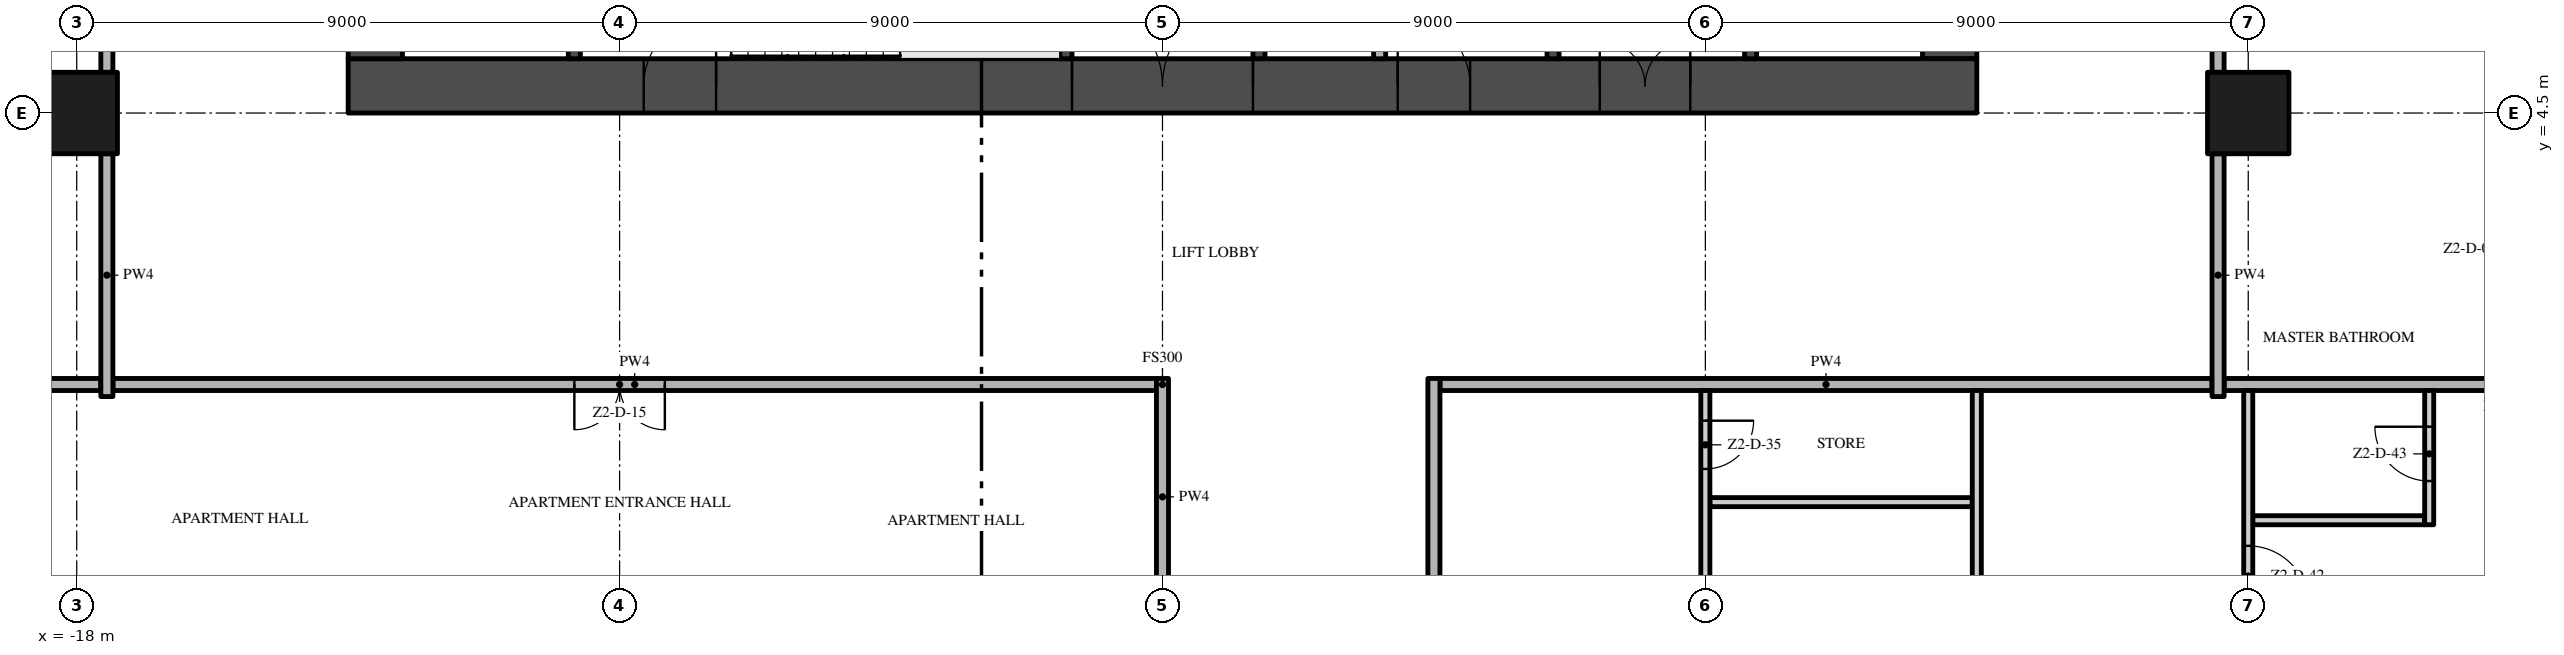
"""IFC4 building model, lengths in metres.
Left out: names, types, materials, properties, quantities, classifications, styles, units other than length and angle.
Written with IfcOpenShell. Run it as: python <this file> out.ifc"""

import sys

from ifc_helpers import new_model, si_unit, direction, frame, frame_2d, origin, origin_2d, place, context, subcontext, project, spatial, rectangle, extrude, element, fill, save


model = new_model("IFC4")
c1 = context("Model", 3, precision=1e-05, world=origin(), true_north=direction((0.0, 1.0)))
c2 = subcontext(c1, "Body", "Model", "MODEL_VIEW")
j1 = project(units=[si_unit("LENGTHUNIT", "METRE"), si_unit("PLANEANGLEUNIT", "RADIAN")], contexts=[c1])
p1 = place(None, origin())
s1 = spatial("IfcSite", under=j1, at=p1, CompositionType="ELEMENT")
p2 = place(p1, origin())
s2 = spatial("IfcBuilding", under=s1, at=p2, CompositionType="ELEMENT")
p3 = place(p2, frame((0.0, 0.0, 107.4)))
s3 = spatial("IfcBuildingStorey", under=s2, at=p3, CompositionType="ELEMENT", Elevation=107.4)
p4 = place(p3, frame((-13.5, 4.95, -0.3), z_axis=(0.0, 0.0, 1.0), x_axis=(1.0, 0.0, 0.0)))
e1 = element("IfcWall", 1, at=p4, inside=s3, PredefinedType="SHEAR", context=c2, shape_type="SweptSolid", body=[
    extrude(rectangle(XDim=27.0, YDim=0.9, at=frame_2d((13.5, 0.0))), origin(), (0.0, 0.0, 1.0), 3.8),
])
p5 = place(p4, frame((12.0, 0.0, 0.3)))
e2 = element("IfcOpeningElement", 2, at=p5, cuts=e1, PredefinedType="OPENING", context=c2, shape_type="SweptSolid", body=[
    extrude(rectangle(XDim=3.0, YDim=2.4, at=frame_2d((1.5, 1.2))), frame((0.0, 0.46, 0.0), z_axis=(0.0, -1.0, 0.0), x_axis=(1.0, 0.0, 0.0)), (0.0, 0.0, 1.0), 0.92),
])
p6 = place(p4, frame((4.9, 0.0, 0.3)))
e3 = element("IfcOpeningElement", 3, at=p6, cuts=e1, PredefinedType="OPENING", context=c2, shape_type="SweptSolid", body=[
    extrude(rectangle(XDim=1.2, YDim=2.2, at=frame_2d((0.6, 1.1))), frame((0.0, 0.46, 0.0), z_axis=(0.0, -1.0, 0.0), x_axis=(1.0, 0.0, 0.0)), (0.0, 0.0, 1.0), 0.92),
])
p7 = place(p4, frame((20.75, 0.0, 0.3)))
e4 = element("IfcOpeningElement", 4, at=p7, cuts=e1, PredefinedType="OPENING", context=c2, shape_type="SweptSolid", body=[
    extrude(rectangle(XDim=1.5, YDim=2.2, at=frame_2d((0.75, 1.1))), frame((0.0, 0.46, 0.0), z_axis=(0.0, -1.0, 0.0), x_axis=(1.0, 0.0, 0.0)), (0.0, 0.0, 1.0), 0.92),
])
p8 = place(p4, frame((17.4, 0.0, 0.3)))
e5 = element("IfcOpeningElement", 5, at=p8, cuts=e1, PredefinedType="OPENING", context=c2, shape_type="SweptSolid", body=[
    extrude(rectangle(XDim=1.2, YDim=2.2, at=frame_2d((0.6, 1.1))), frame((0.0, 0.46, 0.0), z_axis=(0.0, -1.0, 0.0), x_axis=(1.0, 0.0, 0.0)), (0.0, 0.0, 1.0), 0.92),
])
p9 = place(p3, frame((13.05, 5.4, -0.3), z_axis=(0.0, 0.0, 1.0), x_axis=(0.0, 1.0, 0.0)))
e6 = element("IfcWall", 6, at=p9, inside=s3, PredefinedType="SHEAR", context=c2, shape_type="SweptSolid", body=[
    extrude(rectangle(XDim=16.2, YDim=0.9, at=frame_2d((8.1, 0.0))), origin(), (0.0, 0.0, 1.0), 3.8),
])
p10 = place(p9, frame((6.0, 0.0, 0.3)))
e7 = element("IfcOpeningElement", 7, at=p10, cuts=e6, PredefinedType="OPENING", context=c2, shape_type="SweptSolid", body=[
    extrude(rectangle(XDim=1.2, YDim=2.2, at=frame_2d((0.6, 1.1))), frame((0.0, 0.46, 0.0), z_axis=(0.0, -1.0, 0.0), x_axis=(1.0, 0.0, 0.0)), (0.0, 0.0, 1.0), 0.92),
])
p11 = place(p3, frame((-13.05, 21.6, -0.3), z_axis=(0.0, 0.0, 1.0), x_axis=(0.0, -1.0, 0.0)))
e8 = element("IfcWall", 8, at=p11, inside=s3, PredefinedType="SHEAR", context=c2, shape_type="SweptSolid", body=[
    extrude(rectangle(XDim=16.2, YDim=0.9, at=frame_2d((8.1, 0.0))), origin(), (0.0, 0.0, 1.0), 3.8),
])
p12 = place(p11, frame((9.0, 0.0, 0.3)))
e9 = element("IfcOpeningElement", 9, at=p12, cuts=e8, PredefinedType="OPENING", context=c2, shape_type="SweptSolid", body=[
    extrude(rectangle(XDim=1.2, YDim=2.2, at=frame_2d((0.6, 1.1))), frame((0.0, 0.46, 0.0), z_axis=(0.0, -1.0, 0.0), x_axis=(1.0, 0.0, 0.0)), (0.0, 0.0, 1.0), 0.92),
])
for number, where, z_axis, x_axis in (
    (10, (-18.0, 4.5, 0.0), (0.0, 0.0, 1.0), (1.0, 0.0, 0.0)),
    (11, (18.0, 4.5, 0.0), (0.0, 0.0, 1.0), (1.0, 0.0, 0.0)),
):
    element("IfcColumn", number, at=place(p3, frame(where, z_axis=z_axis, x_axis=x_axis)), inside=s3, PredefinedType="COLUMN", context=c2, shape_type="SweptSolid", body=[
        extrude(rectangle(XDim=1.35, YDim=1.35, at=origin_2d()), origin(), (0.0, 0.0, 1.0), 3.5),
    ])
for number, where, z_axis, x_axis in (
    (12, (-9.75, 5.4, 0.0), (0.0, 0.0, 1.0), (0.0, 1.0, 0.0)),
    (13, (-1.6, 5.4, 0.0), (0.0, 0.0, 1.0), (0.0, 1.0, 0.0)),
):
    element("IfcWall", number, at=place(p3, frame(where, z_axis=z_axis, x_axis=x_axis)), inside=s3, PredefinedType="SHEAR", context=c2, shape_type="SweptSolid", body=[
        extrude(rectangle(XDim=2.55, YDim=0.2, at=frame_2d((1.275, 0.0))), origin(), (0.0, 0.0, 1.0), 3.5),
    ])
p13 = place(p3, frame((1.6, 13.5, 0.0), z_axis=(0.0, 0.0, 1.0), x_axis=(0.0, -1.0, 0.0)))
e14 = element("IfcWall", 14, at=p13, inside=s3, PredefinedType="SHEAR", context=c2, shape_type="SweptSolid", body=[
    extrude(rectangle(XDim=8.1, YDim=0.2, at=frame_2d((4.05, 0.0))), origin(), (0.0, 0.0, 1.0), 3.5),
])
p14 = place(p13, frame((3.2, 0.0, 0.0)))
e15 = element("IfcOpeningElement", 15, at=p14, cuts=e14, PredefinedType="OPENING", context=c2, shape_type="SweptSolid", body=[
    extrude(rectangle(XDim=0.9, YDim=2.1, at=frame_2d((0.45, 1.05))), frame((0.0, 0.11, 0.0), z_axis=(0.0, -1.0, 0.0), x_axis=(1.0, 0.0, 0.0)), (0.0, 0.0, 1.0), 0.22),
])
p15 = place(p3, frame((3.6, 13.5, 0.0), z_axis=(0.0, 0.0, 1.0), x_axis=(0.0, -1.0, 0.0)))
e16 = element("IfcWall", 16, at=p15, inside=s3, PredefinedType="PARTITIONING", context=c2, shape_type="SweptSolid", body=[
    extrude(rectangle(XDim=8.1, YDim=0.2, at=frame_2d((4.05, 0.0))), origin(), (0.0, 0.0, 1.0), 3.5),
])
p16 = place(p15, frame((3.6, 0.0, 0.0)))
e17 = element("IfcOpeningElement", 17, at=p16, cuts=e16, PredefinedType="OPENING", context=c2, shape_type="SweptSolid", body=[
    extrude(rectangle(XDim=0.9, YDim=2.1, at=frame_2d((0.45, 1.05))), frame((0.0, 0.11, 0.0), z_axis=(0.0, -1.0, 0.0), x_axis=(1.0, 0.0, 0.0)), (0.0, 0.0, 1.0), 0.22),
])
p17 = place(p3, frame((6.475, 5.4, 0.0), z_axis=(0.0, 0.0, 1.0), x_axis=(0.0, 1.0, 0.0)))
e18 = element("IfcWall", 18, at=p17, inside=s3, PredefinedType="SHEAR", context=c2, shape_type="SweptSolid", body=[
    extrude(rectangle(XDim=6.7, YDim=0.2, at=frame_2d((3.35, 0.0))), origin(), (0.0, 0.0, 1.0), 3.5),
])
p18 = place(p3, frame((9.75, 5.4, 0.0), z_axis=(0.0, 0.0, 1.0), x_axis=(0.0, 1.0, 0.0)))
e19 = element("IfcWall", 19, at=p18, inside=s3, PredefinedType="SHEAR", context=c2, shape_type="SweptSolid", body=[
    extrude(rectangle(XDim=2.2, YDim=0.2, at=frame_2d((1.1, 0.0))), origin(), (0.0, 0.0, 1.0), 3.5),
])
p19 = place(p18, frame((0.55, 0.0, 0.0)))
e20 = element("IfcOpeningElement", 20, at=p19, cuts=e19, PredefinedType="OPENING", context=c2, shape_type="SweptSolid", body=[
    extrude(rectangle(XDim=1.1, YDim=2.1, at=frame_2d((0.55, 1.05))), frame((0.0, 0.11, 0.0), z_axis=(0.0, -1.0, 0.0), x_axis=(1.0, 0.0, 0.0)), (0.0, 0.0, 1.0), 0.22),
])
p20 = place(p3, frame((18.075, -2.25, 0.0), z_axis=(0.0, 0.0, 1.0), x_axis=(1.0, 0.0, 0.0)))
e21 = element("IfcWall", 21, at=p20, inside=s3, PredefinedType="PARTITIONING", context=c2, shape_type="SweptSolid", body=[
    extrude(rectangle(XDim=2.85, YDim=0.15, at=frame_2d((1.425, 0.0))), origin(), (0.0, 0.0, 1.0), 3.5),
])
p21 = place(p3, frame((9.075, -1.95, 0.0), z_axis=(0.0, 0.0, 1.0), x_axis=(1.0, 0.0, 0.0)))
e22 = element("IfcWall", 22, at=p21, inside=s3, PredefinedType="PARTITIONING", context=c2, shape_type="SweptSolid", body=[
    extrude(rectangle(XDim=4.35, YDim=0.15, at=frame_2d((2.175, 0.0))), origin(), (0.0, 0.0, 1.0), 3.5),
])
p22 = place(p3, frame((-0.1, 0.0, 0.0), z_axis=(0.0, 0.0, 1.0), x_axis=(-1.0, 0.0, 0.0)))
e23 = element("IfcWall", 23, at=p22, inside=s3, PredefinedType="PARTITIONING", context=c2, shape_type="SweptSolid", body=[
    extrude(rectangle(XDim=17.3, YDim=0.2, at=frame_2d((8.65, 0.0))), origin(), (0.0, 0.0, 1.0), 3.5),
])
p23 = place(p22, frame((8.15, 0.0, 0.0)))
e24 = element("IfcOpeningElement", 24, at=p23, cuts=e23, PredefinedType="OPENING", context=c2, shape_type="SweptSolid", body=[
    extrude(rectangle(XDim=1.5, YDim=2.4, at=frame_2d((0.75, 1.2))), frame((0.0, 0.11, 0.0), z_axis=(0.0, -1.0, 0.0), x_axis=(1.0, 0.0, 0.0)), (0.0, 0.0, 1.0), 0.22),
])
p24 = place(p3, frame((4.6, 0.0, 0.0), z_axis=(0.0, 0.0, 1.0), x_axis=(1.0, 0.0, 0.0)))
e25 = element("IfcWall", 25, at=p24, inside=s3, PredefinedType="PARTITIONING", context=c2, shape_type="SweptSolid", body=[
    extrude(rectangle(XDim=12.8, YDim=0.2, at=frame_2d((6.4, 0.0))), origin(), (0.0, 0.0, 1.0), 3.5),
])
for number, where, z_axis, x_axis in (
    (26, (-26.7, 0.0, 0.0), (0.0, 0.0, 1.0), (1.0, 0.0, 0.0)),
    (27, (17.6, 0.0, 0.0), (0.0, 0.0, 1.0), (1.0, 0.0, 0.0)),
):
    element("IfcWall", number, at=place(p3, frame(where, z_axis=z_axis, x_axis=x_axis)), inside=s3, PredefinedType="PARTITIONING", context=c2, shape_type="SweptSolid", body=[
        extrude(rectangle(XDim=9.1, YDim=0.2, at=frame_2d((4.55, 0.0))), origin(), (0.0, 0.0, 1.0), 3.5),
    ])
p25 = place(p3, frame((-17.5, -0.2, 0.0), z_axis=(0.0, 0.0, 1.0), x_axis=(0.0, 1.0, 0.0)))
e28 = element("IfcWall", 28, at=p25, inside=s3, PredefinedType="PARTITIONING", context=c2, shape_type="SweptSolid", body=[
    extrude(rectangle(XDim=4.025, YDim=0.2, at=frame_2d((2.013, 0.0))), origin(), (0.0, 0.0, 1.0), 3.5),
])
p26 = place(p3, frame((-17.5, 5.175, 0.0), z_axis=(0.0, 0.0, 1.0), x_axis=(0.0, 1.0, 0.0)))
e29 = element("IfcWall", 29, at=p26, inside=s3, PredefinedType="PARTITIONING", context=c2, shape_type="SweptSolid", body=[
    extrude(rectangle(XDim=7.65, YDim=0.2, at=frame_2d((3.825, 0.0))), origin(), (0.0, 0.0, 1.0), 3.5),
])
p27 = place(p26, frame((3.225, 0.0, 0.0)))
e30 = element("IfcOpeningElement", 30, at=p27, cuts=e29, PredefinedType="OPENING", context=c2, shape_type="SweptSolid", body=[
    extrude(rectangle(XDim=1.2, YDim=2.4, at=frame_2d((0.6, 1.2))), frame((0.0, 0.11, 0.0), z_axis=(0.0, -1.0, 0.0), x_axis=(1.0, 0.0, 0.0)), (0.0, 0.0, 1.0), 0.22),
])
p28 = place(p3, frame((0.0, -3.825, 0.0), z_axis=(0.0, 0.0, 1.0), x_axis=(0.0, 1.0, 0.0)))
e31 = element("IfcWall", 31, at=p28, inside=s3, PredefinedType="PARTITIONING", context=c2, shape_type="SweptSolid", body=[
    extrude(rectangle(XDim=3.925, YDim=0.2, at=frame_2d((1.962, 0.0))), origin(), (0.0, 0.0, 1.0), 3.5),
])
p29 = place(p3, frame((4.5, 0.1, 0.0), z_axis=(0.0, 0.0, 1.0), x_axis=(0.0, -1.0, 0.0)))
e32 = element("IfcWall", 32, at=p29, inside=s3, PredefinedType="PARTITIONING", context=c2, shape_type="SweptSolid", body=[
    extrude(rectangle(XDim=22.3, YDim=0.2, at=frame_2d((11.15, 0.0))), origin(), (0.0, 0.0, 1.0), 3.5),
])
p30 = place(p29, frame((10.6, 0.0, 0.0)))
e33 = element("IfcOpeningElement", 33, at=p30, cuts=e32, PredefinedType="OPENING", context=c2, shape_type="SweptSolid", body=[
    extrude(rectangle(XDim=1.5, YDim=2.4, at=frame_2d((0.75, 1.2))), frame((0.0, 0.11, 0.0), z_axis=(0.0, -1.0, 0.0), x_axis=(1.0, 0.0, 0.0)), (0.0, 0.0, 1.0), 0.22),
])
p31 = place(p3, frame((9.0, -0.1, 0.0), z_axis=(0.0, 0.0, 1.0), x_axis=(0.0, -1.0, 0.0)))
e34 = element("IfcWall", 34, at=p31, inside=s3, PredefinedType="PARTITIONING", context=c2, shape_type="SweptSolid", body=[
    extrude(rectangle(XDim=3.725, YDim=0.15, at=frame_2d((1.863, 0.0))), origin(), (0.0, 0.0, 1.0), 3.5),
])
p32 = place(p31, frame((0.5, 0.0, 0.0)))
e35 = element("IfcOpeningElement", 35, at=p32, cuts=e34, PredefinedType="OPENING", context=c2, shape_type="SweptSolid", body=[
    extrude(rectangle(XDim=0.8, YDim=2.0, at=frame_2d((0.4, 1.0))), frame((0.0, 0.085, 0.0), z_axis=(0.0, -1.0, 0.0), x_axis=(1.0, 0.0, 0.0)), (0.0, 0.0, 1.0), 0.17),
])
p33 = place(p3, frame((13.5, -10.275, 0.0), z_axis=(0.0, 0.0, 1.0), x_axis=(0.0, 1.0, 0.0)))
e36 = element("IfcWall", 36, at=p33, inside=s3, PredefinedType="PARTITIONING", context=c2, shape_type="SweptSolid", body=[
    extrude(rectangle(XDim=10.175, YDim=0.15, at=frame_2d((5.088, 0.0))), origin(), (0.0, 0.0, 1.0), 3.5),
])
p34 = place(p3, frame((17.5, -0.2, 0.0), z_axis=(0.0, 0.0, 1.0), x_axis=(0.0, 1.0, 0.0)))
e37 = element("IfcWall", 37, at=p34, inside=s3, PredefinedType="PARTITIONING", context=c2, shape_type="SweptSolid", body=[
    extrude(rectangle(XDim=4.025, YDim=0.2, at=frame_2d((2.013, 0.0))), origin(), (0.0, 0.0, 1.0), 3.5),
])
p35 = place(p3, frame((17.5, 5.175, 0.0), z_axis=(0.0, 0.0, 1.0), x_axis=(0.0, 1.0, 0.0)))
e38 = element("IfcWall", 38, at=p35, inside=s3, PredefinedType="PARTITIONING", context=c2, shape_type="SweptSolid", body=[
    extrude(rectangle(XDim=7.65, YDim=0.2, at=frame_2d((3.825, 0.0))), origin(), (0.0, 0.0, 1.0), 3.5),
])
p36 = place(p3, frame((18.0, -0.1, 0.0), z_axis=(0.0, 0.0, 1.0), x_axis=(0.0, -1.0, 0.0)))
e39 = element("IfcWall", 39, at=p36, inside=s3, PredefinedType="PARTITIONING", context=c2, shape_type="SweptSolid", body=[
    extrude(rectangle(XDim=3.725, YDim=0.15, at=frame_2d((1.863, 0.0))), origin(), (0.0, 0.0, 1.0), 3.5),
])
p37 = place(p36, frame((2.575, 0.0, 0.0)))
e40 = element("IfcOpeningElement", 40, at=p37, cuts=e39, PredefinedType="OPENING", context=c2, shape_type="SweptSolid", body=[
    extrude(rectangle(XDim=1.0, YDim=2.4, at=frame_2d((0.5, 1.2))), frame((0.0, 0.085, 0.0), z_axis=(0.0, -1.0, 0.0), x_axis=(1.0, 0.0, 0.0)), (0.0, 0.0, 1.0), 0.17),
])
p38 = place(p3, frame((21.0, -2.325, 0.0), z_axis=(0.0, 0.0, 1.0), x_axis=(0.0, 1.0, 0.0)))
e41 = element("IfcWall", 41, at=p38, inside=s3, PredefinedType="PARTITIONING", context=c2, shape_type="SweptSolid", body=[
    extrude(rectangle(XDim=2.225, YDim=0.15, at=frame_2d((1.113, 0.0))), origin(), (0.0, 0.0, 1.0), 3.5),
])
p39 = place(p38, frame((0.725, 0.0, 0.0)))
e42 = element("IfcOpeningElement", 42, at=p39, cuts=e41, PredefinedType="OPENING", context=c2, shape_type="SweptSolid", body=[
    extrude(rectangle(XDim=0.9, YDim=2.1, at=frame_2d((0.45, 1.05))), frame((0.0, 0.085, 0.0), z_axis=(0.0, -1.0, 0.0), x_axis=(1.0, 0.0, 0.0)), (0.0, 0.0, 1.0), 0.17),
])
p40 = place(p5, frame((3.0, 0.0, 0.0), z_axis=(0.0, 0.0, 1.0), x_axis=(-1.0, 0.0, 0.0)))
e43 = element("IfcDoor", 43, at=p40, inside=s3, OperationType="DOUBLE_DOOR_SINGLE_SWING", PredefinedType="DOOR", context=c2, shape_type="SweptSolid", body=[
    extrude(rectangle(XDim=3.0, YDim=2.4, at=frame_2d((1.5, 1.2))), frame((0.0, 0.025, 0.0), z_axis=(0.0, -1.0, 0.0), x_axis=(1.0, 0.0, 0.0)), (0.0, 0.0, 1.0), 0.05),
])
fill(e2, e43)
p41 = place(p6, frame((1.2, 0.0, 0.0), z_axis=(0.0, 0.0, 1.0), x_axis=(-1.0, 0.0, 0.0)))
e44 = element("IfcDoor", 44, at=p41, inside=s3, OperationType="SINGLE_SWING_LEFT", PredefinedType="DOOR", context=c2, shape_type="SweptSolid", body=[
    extrude(rectangle(XDim=1.2, YDim=2.2, at=frame_2d((0.6, 1.1))), frame((0.0, 0.025, 0.0), z_axis=(0.0, -1.0, 0.0), x_axis=(1.0, 0.0, 0.0)), (0.0, 0.0, 1.0), 0.05),
])
fill(e3, e44)
p42 = place(p7, frame((1.5, 0.0, 0.0), z_axis=(0.0, 0.0, 1.0), x_axis=(-1.0, 0.0, 0.0)))
e45 = element("IfcDoor", 45, at=p42, inside=s3, OperationType="DOUBLE_DOOR_SINGLE_SWING", PredefinedType="DOOR", context=c2, shape_type="SweptSolid", body=[
    extrude(rectangle(XDim=1.5, YDim=2.2, at=frame_2d((0.75, 1.1))), frame((0.0, 0.025, 0.0), z_axis=(0.0, -1.0, 0.0), x_axis=(1.0, 0.0, 0.0)), (0.0, 0.0, 1.0), 0.05),
])
fill(e4, e45)
p43 = place(p8, frame((1.2, 0.0, 0.0), z_axis=(0.0, 0.0, 1.0), x_axis=(-1.0, 0.0, 0.0)))
e46 = element("IfcDoor", 46, at=p43, inside=s3, OperationType="SINGLE_SWING_RIGHT", PredefinedType="DOOR", context=c2, shape_type="SweptSolid", body=[
    extrude(rectangle(XDim=1.2, YDim=2.2, at=frame_2d((0.6, 1.1))), frame((0.0, 0.025, 0.0), z_axis=(0.0, -1.0, 0.0), x_axis=(1.0, 0.0, 0.0)), (0.0, 0.0, 1.0), 0.05),
])
fill(e5, e46)
p44 = place(p23, origin())
e47 = element("IfcDoor", 47, at=p44, inside=s3, OperationType="DOUBLE_DOOR_SINGLE_SWING", PredefinedType="DOOR", context=c2, shape_type="SweptSolid", body=[
    extrude(rectangle(XDim=1.5, YDim=2.4, at=frame_2d((0.75, 1.2))), frame((0.0, 0.025, 0.0), z_axis=(0.0, -1.0, 0.0), x_axis=(1.0, 0.0, 0.0)), (0.0, 0.0, 1.0), 0.05),
])
fill(e24, e47)
p45 = place(p32, origin())
e48 = element("IfcDoor", 48, at=p45, inside=s3, OperationType="SINGLE_SWING_LEFT", PredefinedType="DOOR", context=c2, shape_type="SweptSolid", body=[
    extrude(rectangle(XDim=0.8, YDim=2.0, at=frame_2d((0.4, 1.0))), frame((0.0, 0.025, 0.0), z_axis=(0.0, -1.0, 0.0), x_axis=(1.0, 0.0, 0.0)), (0.0, 0.0, 1.0), 0.05),
])
fill(e35, e48)
p46 = place(p37, origin())
e49 = element("IfcDoor", 49, at=p46, inside=s3, OperationType="SINGLE_SWING_RIGHT", PredefinedType="DOOR", context=c2, shape_type="SweptSolid", body=[
    extrude(rectangle(XDim=1.0, YDim=2.4, at=frame_2d((0.5, 1.2))), frame((0.0, 0.025, 0.0), z_axis=(0.0, -1.0, 0.0), x_axis=(1.0, 0.0, 0.0)), (0.0, 0.0, 1.0), 0.05),
])
fill(e40, e49)
p47 = place(p39, origin())
e50 = element("IfcDoor", 50, at=p47, inside=s3, OperationType="SINGLE_SWING_RIGHT", PredefinedType="DOOR", context=c2, shape_type="SweptSolid", body=[
    extrude(rectangle(XDim=0.9, YDim=2.1, at=frame_2d((0.45, 1.05))), frame((0.0, 0.025, 0.0), z_axis=(0.0, -1.0, 0.0), x_axis=(1.0, 0.0, 0.0)), (0.0, 0.0, 1.0), 0.05),
])
fill(e42, e50)
save(model, sys.argv[1])
